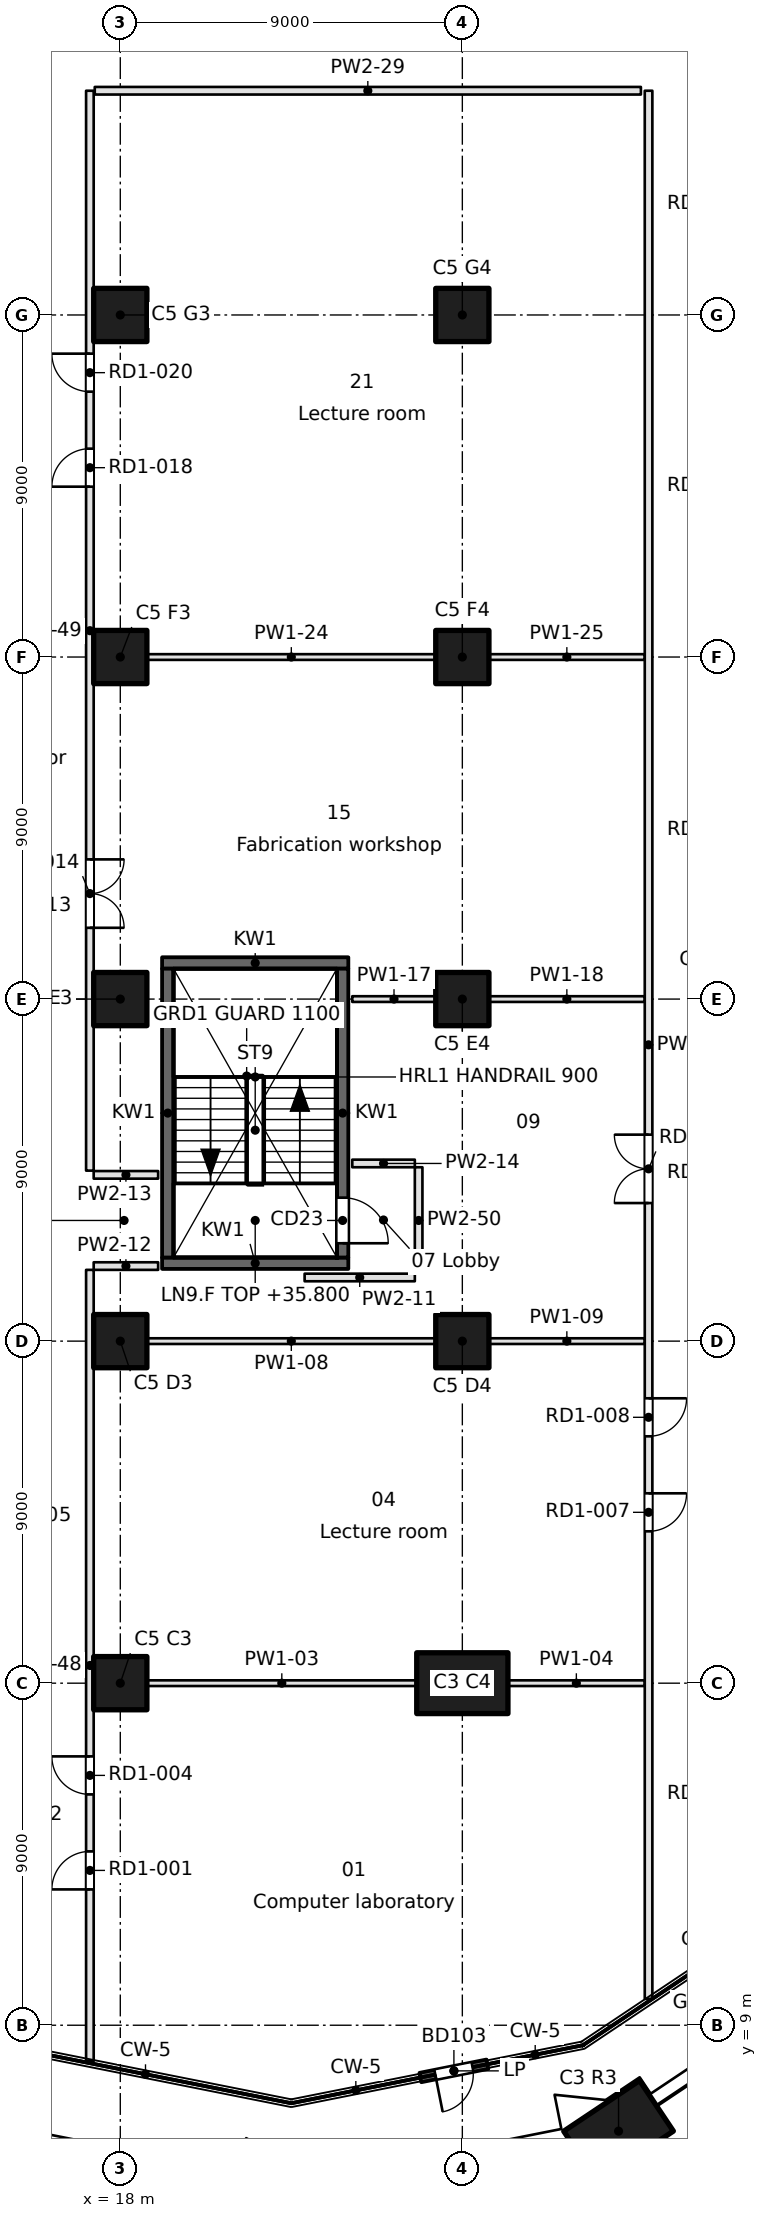
"""IFC4 building model, lengths in metres.
Left out: names, types, materials, properties, quantities, classifications, styles, units other than length and angle.
Written with IfcOpenShell. Run it as: python <this file> out.ifc"""

import sys

from ifc_helpers import new_model, si_unit, direction, frame, frame_2d, origin, origin_2d, place, context, subcontext, project, spatial, rectangle, extrude, element, fill, save


model = new_model("IFC4")
c1 = context("Model", 3, precision=1e-05, world=origin(), true_north=direction((0.0, 1.0)))
c2 = subcontext(c1, "Body", "Model", "MODEL_VIEW")
j1 = project(units=[si_unit("LENGTHUNIT", "METRE"), si_unit("PLANEANGLEUNIT", "RADIAN")], contexts=[c1])
p1 = place(None, origin())
s1 = spatial("IfcSite", under=j1, at=p1, CompositionType="ELEMENT")
p2 = place(p1, origin())
s2 = spatial("IfcBuilding", under=s1, at=p2, CompositionType="ELEMENT")
p3 = place(p2, frame((0.0, 0.0, 35.8)))
s3 = spatial("IfcBuildingStorey", under=s2, at=p3, CompositionType="ELEMENT", Elevation=35.8)
p4 = place(p3, frame((31.11, 6.213, 0.0), z_axis=(0.0, 0.0, 1.0), x_axis=(0.831469612303, 0.55557023302, 0.0)))
e1 = element("IfcColumn", 1, at=p4, inside=s3, PredefinedType="COLUMN", context=c2, shape_type="SweptSolid", body=[
    extrude(rectangle(XDim=2.4, YDim=1.6, at=origin_2d()), origin(), (0.0, 0.0, 1.0), 3.7),
])
for number, where, z_axis, x_axis in (
    (2, (18.0, 18.0, 0.0), (0.0, 0.0, 1.0), (1.0, 0.0, 0.0)),
    (3, (18.0, 27.0, 0.0), (0.0, 0.0, 1.0), (1.0, 0.0, 0.0)),
    (4, (18.0, 36.0, 0.0), (0.0, 0.0, 1.0), (1.0, 0.0, 0.0)),
    (5, (18.0, 45.0, 0.0), (0.0, 0.0, 1.0), (1.0, 0.0, 0.0)),
    (6, (18.0, 54.0, 0.0), (0.0, 0.0, 1.0), (1.0, 0.0, 0.0)),
):
    element("IfcColumn", number, at=place(p3, frame(where, z_axis=z_axis, x_axis=x_axis)), inside=s3, PredefinedType="COLUMN", context=c2, shape_type="SweptSolid", body=[
        extrude(rectangle(XDim=1.4, YDim=1.4, at=origin_2d()), origin(), (0.0, 0.0, 1.0), 3.7),
    ])
p5 = place(p3, frame((27.0, 18.0, 0.0), z_axis=(0.0, 0.0, 1.0), x_axis=(1.0, 0.0, 0.0)))
e7 = element("IfcColumn", 7, at=p5, inside=s3, PredefinedType="COLUMN", context=c2, shape_type="SweptSolid", body=[
    extrude(rectangle(XDim=2.4, YDim=1.6, at=origin_2d()), origin(), (0.0, 0.0, 1.0), 3.7),
])
for number, where, z_axis, x_axis in (
    (8, (27.0, 27.0, 0.0), (0.0, 0.0, 1.0), (1.0, 0.0, 0.0)),
    (9, (27.0, 36.0, 0.0), (0.0, 0.0, 1.0), (1.0, 0.0, 0.0)),
    (10, (27.0, 45.0, 0.0), (0.0, 0.0, 1.0), (1.0, 0.0, 0.0)),
    (11, (27.0, 54.0, 0.0), (0.0, 0.0, 1.0), (1.0, 0.0, 0.0)),
):
    element("IfcColumn", number, at=place(p3, frame(where, z_axis=z_axis, x_axis=x_axis)), inside=s3, PredefinedType="COLUMN", context=c2, shape_type="SweptSolid", body=[
        extrude(rectangle(XDim=1.4, YDim=1.4, at=origin_2d()), origin(), (0.0, 0.0, 1.0), 3.7),
    ])
p6 = place(p3, frame((25.896, 7.624, 0.0), z_axis=(0.0, 0.0, 1.0), x_axis=(0.980793982239, 0.195046569833, 0.0)))
e12 = element("IfcWall", 12, at=p6, inside=s3, PredefinedType="SOLIDWALL", context=c2, shape_type="SweptSolid", body=[
    extrude(rectangle(XDim=1.8, YDim=0.25, at=frame_2d((0.9, 0.0))), origin(), (0.0, 0.0, 1.0), 3.3),
])
p7 = place(p6, frame((0.4, 0.0, 0.0)))
e13 = element("IfcOpeningElement", 13, at=p7, cuts=e12, PredefinedType="OPENING", context=c2, shape_type="SweptSolid", body=[
    extrude(rectangle(XDim=1.0, YDim=2.1, at=frame_2d((0.5, 1.05))), frame((0.0, 0.125, 0.0), z_axis=(0.0, -1.0, 0.0), x_axis=(1.0, 0.0, 0.0)), (0.0, 0.0, 1.0), 0.25),
])
for number, where, z_axis, x_axis in (
    (14, (19.1, 29.05, -0.4), (0.0, 0.0, 1.0), (1.0, 0.0, 0.0)),
    (15, (19.1, 36.95, -0.4), (0.0, 0.0, 1.0), (1.0, 0.0, 0.0)),
):
    element("IfcWall", number, at=place(p3, frame(where, z_axis=z_axis, x_axis=x_axis)), inside=s3, PredefinedType="SOLIDWALL", context=c2, shape_type="SweptSolid", body=[
        extrude(rectangle(XDim=4.9, YDim=0.3, at=frame_2d((2.45, 0.0))), origin(), (0.0, 0.0, 1.0), 3.7),
    ])
p8 = place(p3, frame((19.25, 29.2, -0.4), z_axis=(0.0, 0.0, 1.0), x_axis=(0.0, 1.0, 0.0)))
e16 = element("IfcWall", 16, at=p8, inside=s3, PredefinedType="SOLIDWALL", context=c2, shape_type="SweptSolid", body=[
    extrude(rectangle(XDim=7.6, YDim=0.3, at=frame_2d((3.8, 0.0))), origin(), (0.0, 0.0, 1.0), 3.7),
])
p9 = place(p3, frame((23.85, 29.2, -0.4), z_axis=(0.0, 0.0, 1.0), x_axis=(0.0, 1.0, 0.0)))
e17 = element("IfcWall", 17, at=p9, inside=s3, PredefinedType="SOLIDWALL", context=c2, shape_type="SweptSolid", body=[
    extrude(rectangle(XDim=7.6, YDim=0.3, at=frame_2d((3.8, 0.0))), origin(), (0.0, 0.0, 1.0), 3.7),
])
p10 = place(p9, frame((0.375, 0.0, 0.4)))
e18 = element("IfcOpeningElement", 18, at=p10, cuts=e17, PredefinedType="OPENING", context=c2, shape_type="SweptSolid", body=[
    extrude(rectangle(XDim=1.2, YDim=2.1, at=frame_2d((0.6, 1.05))), frame((0.0, 0.15, 0.0), z_axis=(0.0, -1.0, 0.0), x_axis=(1.0, 0.0, 0.0)), (0.0, 0.0, 1.0), 0.3),
])
p11 = place(p3, frame((18.7, 18.0, 0.0), z_axis=(0.0, 0.0, 1.0), x_axis=(1.0, 0.0, 0.0)))
e19 = element("IfcWall", 19, at=p11, inside=s3, PredefinedType="PARTITIONING", context=c2, shape_type="SweptSolid", body=[
    extrude(rectangle(XDim=7.1, YDim=0.15, at=frame_2d((3.55, 0.0))), origin(), (0.0, 0.0, 1.0), 3.3),
])
p12 = place(p3, frame((28.2, 18.0, 0.0), z_axis=(0.0, 0.0, 1.0), x_axis=(1.0, 0.0, 0.0)))
e20 = element("IfcWall", 20, at=p12, inside=s3, PredefinedType="PARTITIONING", context=c2, shape_type="SweptSolid", body=[
    extrude(rectangle(XDim=3.6, YDim=0.15, at=frame_2d((1.8, 0.0))), origin(), (0.0, 0.0, 1.0), 3.3),
])
p13 = place(p3, frame((18.7, 27.0, 0.0), z_axis=(0.0, 0.0, 1.0), x_axis=(1.0, 0.0, 0.0)))
e21 = element("IfcWall", 21, at=p13, inside=s3, PredefinedType="PARTITIONING", context=c2, shape_type="SweptSolid", body=[
    extrude(rectangle(XDim=7.6, YDim=0.15, at=frame_2d((3.8, 0.0))), origin(), (0.0, 0.0, 1.0), 3.3),
])
p14 = place(p3, frame((27.7, 27.0, 0.0), z_axis=(0.0, 0.0, 1.0), x_axis=(1.0, 0.0, 0.0)))
e22 = element("IfcWall", 22, at=p14, inside=s3, PredefinedType="PARTITIONING", context=c2, shape_type="SweptSolid", body=[
    extrude(rectangle(XDim=4.1, YDim=0.15, at=frame_2d((2.05, 0.0))), origin(), (0.0, 0.0, 1.0), 3.3),
])
p15 = place(p3, frame((25.75, 28.675, 0.0), z_axis=(0.0, 0.0, 1.0), x_axis=(-1.0, 0.0, 0.0)))
e23 = element("IfcWall", 23, at=p15, inside=s3, PredefinedType="PARTITIONING", context=c2, shape_type="SweptSolid", body=[
    extrude(rectangle(XDim=2.9, YDim=0.2, at=frame_2d((1.45, 0.0))), origin(), (0.0, 0.0, 1.0), 3.3),
])
for number, where, z_axis, x_axis in (
    (24, (18.996, 28.975, 0.0), (0.0, 0.0, 1.0), (-1.0, 0.0, 0.0)),
    (25, (17.3, 31.375, 0.0), (0.0, 0.0, 1.0), (1.0, 0.0, 0.0)),
):
    element("IfcWall", number, at=place(p3, frame(where, z_axis=z_axis, x_axis=x_axis)), inside=s3, PredefinedType="PARTITIONING", context=c2, shape_type="SweptSolid", body=[
        extrude(rectangle(XDim=1.696, YDim=0.2, at=frame_2d((0.848, 0.0))), origin(), (0.0, 0.0, 1.0), 3.3),
    ])
p16 = place(p3, frame((24.104, 31.675, 0.0), z_axis=(0.0, 0.0, 1.0), x_axis=(1.0, 0.0, 0.0)))
e26 = element("IfcWall", 26, at=p16, inside=s3, PredefinedType="PARTITIONING", context=c2, shape_type="SweptSolid", body=[
    extrude(rectangle(XDim=1.646, YDim=0.2, at=frame_2d((0.823, 0.0))), origin(), (0.0, 0.0, 1.0), 3.3),
])
p17 = place(p3, frame((24.104, 36.0, 0.0), z_axis=(0.0, 0.0, 1.0), x_axis=(1.0, 0.0, 0.0)))
e27 = element("IfcWall", 27, at=p17, inside=s3, PredefinedType="PARTITIONING", context=c2, shape_type="SweptSolid", body=[
    extrude(rectangle(XDim=2.196, YDim=0.15, at=frame_2d((1.098, 0.0))), origin(), (0.0, 0.0, 1.0), 3.3),
])
p18 = place(p3, frame((27.7, 36.0, 0.0), z_axis=(0.0, 0.0, 1.0), x_axis=(1.0, 0.0, 0.0)))
e28 = element("IfcWall", 28, at=p18, inside=s3, PredefinedType="PARTITIONING", context=c2, shape_type="SweptSolid", body=[
    extrude(rectangle(XDim=4.1, YDim=0.15, at=frame_2d((2.05, 0.0))), origin(), (0.0, 0.0, 1.0), 3.3),
])
p19 = place(p3, frame((18.7, 45.0, 0.0), z_axis=(0.0, 0.0, 1.0), x_axis=(1.0, 0.0, 0.0)))
e29 = element("IfcWall", 29, at=p19, inside=s3, PredefinedType="PARTITIONING", context=c2, shape_type="SweptSolid", body=[
    extrude(rectangle(XDim=7.6, YDim=0.15, at=frame_2d((3.8, 0.0))), origin(), (0.0, 0.0, 1.0), 3.3),
])
p20 = place(p3, frame((27.7, 45.0, 0.0), z_axis=(0.0, 0.0, 1.0), x_axis=(1.0, 0.0, 0.0)))
e30 = element("IfcWall", 30, at=p20, inside=s3, PredefinedType="PARTITIONING", context=c2, shape_type="SweptSolid", body=[
    extrude(rectangle(XDim=4.1, YDim=0.15, at=frame_2d((2.05, 0.0))), origin(), (0.0, 0.0, 1.0), 3.3),
])
p21 = place(p3, frame((31.698, 59.9, 0.0), z_axis=(0.0, 0.0, 1.0), x_axis=(-1.0, 0.0, 0.0)))
e31 = element("IfcWall", 31, at=p21, inside=s3, PredefinedType="PARTITIONING", context=c2, shape_type="SweptSolid", body=[
    extrude(rectangle(XDim=14.37, YDim=0.2, at=frame_2d((7.185, 0.0))), origin(), (0.0, 0.0, 1.0), 3.3),
])
p22 = place(p3, frame((17.2, 28.875, 0.0), z_axis=(0.0, 0.0, 1.0), x_axis=(0.0, -1.0, 0.0)))
e32 = element("IfcWall", 32, at=p22, inside=s3, PredefinedType="PARTITIONING", context=c2, shape_type="SweptSolid", body=[
    extrude(rectangle(XDim=20.818, YDim=0.2, at=frame_2d((10.409, 0.0))), origin(), (0.0, 0.0, 1.0), 3.3),
])
p23 = place(p22, frame((15.302, 0.0, 0.0)))
e33 = element("IfcOpeningElement", 33, at=p23, cuts=e32, PredefinedType="OPENING", context=c2, shape_type="SweptSolid", body=[
    extrude(rectangle(XDim=1.0, YDim=2.1, at=frame_2d((0.5, 1.05))), frame((0.0, 0.1, 0.0), z_axis=(0.0, -1.0, 0.0), x_axis=(1.0, 0.0, 0.0)), (0.0, 0.0, 1.0), 0.2),
])
p24 = place(p22, frame((12.802, 0.0, 0.0)))
e34 = element("IfcOpeningElement", 34, at=p24, cuts=e32, PredefinedType="OPENING", context=c2, shape_type="SweptSolid", body=[
    extrude(rectangle(XDim=1.0, YDim=2.1, at=frame_2d((0.5, 1.05))), frame((0.0, 0.1, 0.0), z_axis=(0.0, -1.0, 0.0), x_axis=(1.0, 0.0, 0.0)), (0.0, 0.0, 1.0), 0.2),
])
p25 = place(p3, frame((17.2, 59.9, 0.0), z_axis=(0.0, 0.0, 1.0), x_axis=(0.0, -1.0, 0.0)))
e35 = element("IfcWall", 35, at=p25, inside=s3, PredefinedType="PARTITIONING", context=c2, shape_type="SweptSolid", body=[
    extrude(rectangle(XDim=28.414, YDim=0.2, at=frame_2d((14.207, 0.0))), origin(), (0.0, 0.0, 1.0), 3.3),
])
p26 = place(p25, frame((20.225, 0.0, 0.0)))
e36 = element("IfcOpeningElement", 36, at=p26, cuts=e35, PredefinedType="OPENING", context=c2, shape_type="SweptSolid", body=[
    extrude(rectangle(XDim=1.8, YDim=2.1, at=frame_2d((0.9, 1.05))), frame((0.0, 0.1, 0.0), z_axis=(0.0, -1.0, 0.0), x_axis=(1.0, 0.0, 0.0)), (0.0, 0.0, 1.0), 0.2),
])
p27 = place(p25, frame((9.418, 0.0, 0.0)))
e37 = element("IfcOpeningElement", 37, at=p27, cuts=e35, PredefinedType="OPENING", context=c2, shape_type="SweptSolid", body=[
    extrude(rectangle(XDim=1.0, YDim=2.1, at=frame_2d((0.5, 1.05))), frame((0.0, 0.1, 0.0), z_axis=(0.0, -1.0, 0.0), x_axis=(1.0, 0.0, 0.0)), (0.0, 0.0, 1.0), 0.2),
])
p28 = place(p25, frame((6.918, 0.0, 0.0)))
e38 = element("IfcOpeningElement", 38, at=p28, cuts=e35, PredefinedType="OPENING", context=c2, shape_type="SweptSolid", body=[
    extrude(rectangle(XDim=1.0, YDim=2.1, at=frame_2d((0.5, 1.05))), frame((0.0, 0.1, 0.0), z_axis=(0.0, -1.0, 0.0), x_axis=(1.0, 0.0, 0.0)), (0.0, 0.0, 1.0), 0.2),
])
p29 = place(p3, frame((25.85, 31.575, 0.0), z_axis=(0.0, 0.0, 1.0), x_axis=(0.0, -1.0, 0.0)))
e39 = element("IfcWall", 39, at=p29, inside=s3, PredefinedType="PARTITIONING", context=c2, shape_type="SweptSolid", body=[
    extrude(rectangle(XDim=2.8, YDim=0.2, at=frame_2d((1.4, 0.0))), origin(), (0.0, 0.0, 1.0), 3.3),
])
p30 = place(p3, frame((31.9, 9.693, 0.0), z_axis=(0.0, 0.0, 1.0), x_axis=(0.0, 1.0, 0.0)))
e40 = element("IfcWall", 40, at=p30, inside=s3, PredefinedType="PARTITIONING", context=c2, shape_type="SweptSolid", body=[
    extrude(rectangle(XDim=50.207, YDim=0.2, at=frame_2d((25.104, 0.0))), origin(), (0.0, 0.0, 1.0), 3.3),
])
p31 = place(p30, frame((12.303, 0.0, 0.0)))
e41 = element("IfcOpeningElement", 41, at=p31, cuts=e40, PredefinedType="OPENING", context=c2, shape_type="SweptSolid", body=[
    extrude(rectangle(XDim=1.0, YDim=2.1, at=frame_2d((0.5, 1.05))), frame((0.0, 0.1, 0.0), z_axis=(0.0, -1.0, 0.0), x_axis=(1.0, 0.0, 0.0)), (0.0, 0.0, 1.0), 0.2),
])
p32 = place(p30, frame((14.803, 0.0, 0.0)))
e42 = element("IfcOpeningElement", 42, at=p32, cuts=e40, PredefinedType="OPENING", context=c2, shape_type="SweptSolid", body=[
    extrude(rectangle(XDim=1.0, YDim=2.1, at=frame_2d((0.5, 1.05))), frame((0.0, 0.1, 0.0), z_axis=(0.0, -1.0, 0.0), x_axis=(1.0, 0.0, 0.0)), (0.0, 0.0, 1.0), 0.2),
])
p33 = place(p30, frame((20.94, 0.0, 0.0)))
e43 = element("IfcOpeningElement", 43, at=p33, cuts=e40, PredefinedType="OPENING", context=c2, shape_type="SweptSolid", body=[
    extrude(rectangle(XDim=1.8, YDim=2.1, at=frame_2d((0.9, 1.05))), frame((0.0, 0.1, 0.0), z_axis=(0.0, -1.0, 0.0), x_axis=(1.0, 0.0, 0.0)), (0.0, 0.0, 1.0), 0.2),
])
p34 = place(p7, frame((1.0, 0.0, 0.0), z_axis=(0.0, 0.0, 1.0), x_axis=(-1.0, 0.0, 0.0)))
e44 = element("IfcDoor", 44, at=p34, inside=s3, OperationType="SINGLE_SWING_RIGHT", PredefinedType="DOOR", context=c2, shape_type="SweptSolid", body=[
    extrude(rectangle(XDim=1.0, YDim=2.1, at=frame_2d((0.5, 1.05))), frame((0.0, 0.025, 0.0), z_axis=(0.0, -1.0, 0.0), x_axis=(1.0, 0.0, 0.0)), (0.0, 0.0, 1.0), 0.05),
])
fill(e13, e44)
p35 = place(p10, frame((1.2, 0.0, 0.0), z_axis=(0.0, 0.0, 1.0), x_axis=(-1.0, 0.0, 0.0)))
e45 = element("IfcDoor", 45, at=p35, inside=s3, OperationType="SINGLE_SWING_RIGHT", PredefinedType="DOOR", context=c2, shape_type="SweptSolid", body=[
    extrude(rectangle(XDim=1.2, YDim=2.1, at=frame_2d((0.6, 1.05))), frame((0.0, 0.025, 0.0), z_axis=(0.0, -1.0, 0.0), x_axis=(1.0, 0.0, 0.0)), (0.0, 0.0, 1.0), 0.05),
])
fill(e18, e45)
p36 = place(p23, frame((1.0, 0.0, 0.0), z_axis=(0.0, 0.0, 1.0), x_axis=(-1.0, 0.0, 0.0)))
e46 = element("IfcDoor", 46, at=p36, inside=s3, OperationType="SINGLE_SWING_LEFT", PredefinedType="DOOR", context=c2, shape_type="SweptSolid", body=[
    extrude(rectangle(XDim=1.0, YDim=2.1, at=frame_2d((0.5, 1.05))), frame((0.0, 0.025, 0.0), z_axis=(0.0, -1.0, 0.0), x_axis=(1.0, 0.0, 0.0)), (0.0, 0.0, 1.0), 0.05),
])
fill(e33, e46)
p37 = place(p24, frame((1.0, 0.0, 0.0), z_axis=(0.0, 0.0, 1.0), x_axis=(-1.0, 0.0, 0.0)))
e47 = element("IfcDoor", 47, at=p37, inside=s3, OperationType="SINGLE_SWING_RIGHT", PredefinedType="DOOR", context=c2, shape_type="SweptSolid", body=[
    extrude(rectangle(XDim=1.0, YDim=2.1, at=frame_2d((0.5, 1.05))), frame((0.0, 0.025, 0.0), z_axis=(0.0, -1.0, 0.0), x_axis=(1.0, 0.0, 0.0)), (0.0, 0.0, 1.0), 0.05),
])
fill(e34, e47)
p38 = place(p31, frame((1.0, 0.0, 0.0), z_axis=(0.0, 0.0, 1.0), x_axis=(-1.0, 0.0, 0.0)))
e48 = element("IfcDoor", 48, at=p38, inside=s3, OperationType="SINGLE_SWING_LEFT", PredefinedType="DOOR", context=c2, shape_type="SweptSolid", body=[
    extrude(rectangle(XDim=1.0, YDim=2.1, at=frame_2d((0.5, 1.05))), frame((0.0, 0.025, 0.0), z_axis=(0.0, -1.0, 0.0), x_axis=(1.0, 0.0, 0.0)), (0.0, 0.0, 1.0), 0.05),
])
fill(e41, e48)
p39 = place(p32, frame((1.0, 0.0, 0.0), z_axis=(0.0, 0.0, 1.0), x_axis=(-1.0, 0.0, 0.0)))
e49 = element("IfcDoor", 49, at=p39, inside=s3, OperationType="SINGLE_SWING_LEFT", PredefinedType="DOOR", context=c2, shape_type="SweptSolid", body=[
    extrude(rectangle(XDim=1.0, YDim=2.1, at=frame_2d((0.5, 1.05))), frame((0.0, 0.025, 0.0), z_axis=(0.0, -1.0, 0.0), x_axis=(1.0, 0.0, 0.0)), (0.0, 0.0, 1.0), 0.05),
])
fill(e42, e49)
p40 = place(p33, origin())
e50 = element("IfcDoor", 50, at=p40, inside=s3, OperationType="DOUBLE_DOOR_SINGLE_SWING", PredefinedType="DOOR", context=c2, shape_type="SweptSolid", body=[
    extrude(rectangle(XDim=1.8, YDim=2.1, at=frame_2d((0.9, 1.05))), frame((0.0, 0.025, 0.0), z_axis=(0.0, -1.0, 0.0), x_axis=(1.0, 0.0, 0.0)), (0.0, 0.0, 1.0), 0.05),
])
fill(e43, e50)
p41 = place(p26, origin())
e51 = element("IfcDoor", 51, at=p41, inside=s3, OperationType="DOUBLE_DOOR_SINGLE_SWING", PredefinedType="DOOR", context=c2, shape_type="SweptSolid", body=[
    extrude(rectangle(XDim=1.8, YDim=2.1, at=frame_2d((0.9, 1.05))), frame((0.0, 0.025, 0.0), z_axis=(0.0, -1.0, 0.0), x_axis=(1.0, 0.0, 0.0)), (0.0, 0.0, 1.0), 0.05),
])
fill(e36, e51)
p42 = place(p27, frame((1.0, 0.0, 0.0), z_axis=(0.0, 0.0, 1.0), x_axis=(-1.0, 0.0, 0.0)))
e52 = element("IfcDoor", 52, at=p42, inside=s3, OperationType="SINGLE_SWING_LEFT", PredefinedType="DOOR", context=c2, shape_type="SweptSolid", body=[
    extrude(rectangle(XDim=1.0, YDim=2.1, at=frame_2d((0.5, 1.05))), frame((0.0, 0.025, 0.0), z_axis=(0.0, -1.0, 0.0), x_axis=(1.0, 0.0, 0.0)), (0.0, 0.0, 1.0), 0.05),
])
fill(e37, e52)
p43 = place(p28, frame((1.0, 0.0, 0.0), z_axis=(0.0, 0.0, 1.0), x_axis=(-1.0, 0.0, 0.0)))
e53 = element("IfcDoor", 53, at=p43, inside=s3, OperationType="SINGLE_SWING_RIGHT", PredefinedType="DOOR", context=c2, shape_type="SweptSolid", body=[
    extrude(rectangle(XDim=1.0, YDim=2.1, at=frame_2d((0.5, 1.05))), frame((0.0, 0.025, 0.0), z_axis=(0.0, -1.0, 0.0), x_axis=(1.0, 0.0, 0.0)), (0.0, 0.0, 1.0), 0.05),
])
fill(e38, e53)
save(model, sys.argv[1])
